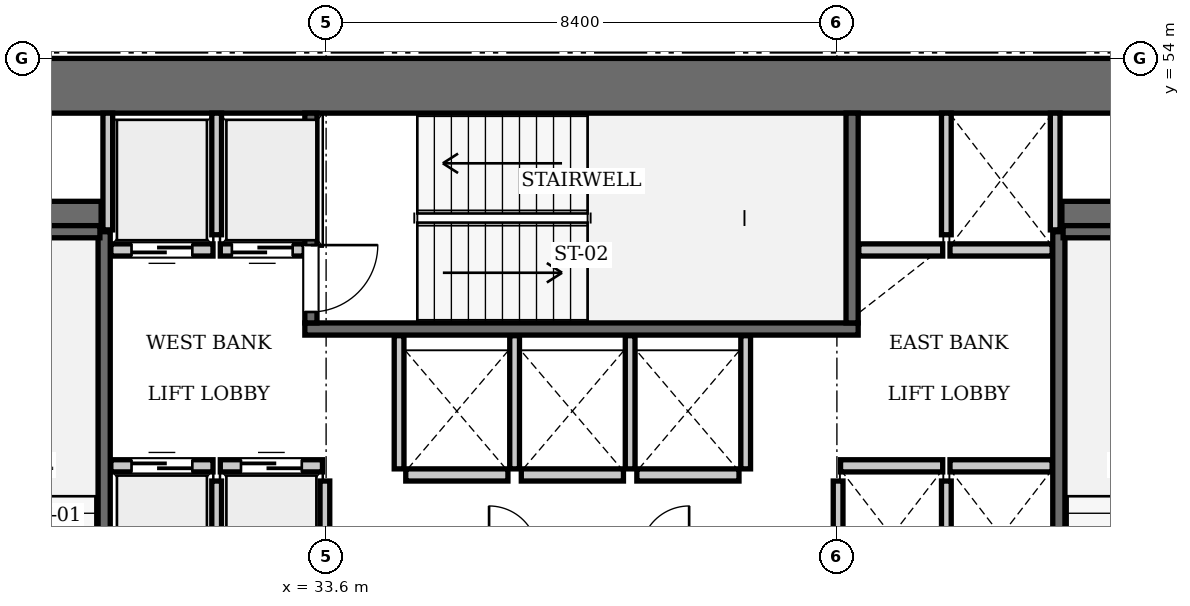
"""IFC4 building model, lengths in metres.
Left out: names, types, materials, properties, quantities, classifications, styles, units other than length and angle.
Written with IfcOpenShell. Run it as: python <this file> out.ifc"""

import sys

from ifc_helpers import new_model, si_unit, direction, frame, frame_2d, origin, place, context, subcontext, project, spatial, rectangle, extrude, element, fill, save


model = new_model("IFC4")
c1 = context("Model", 3, precision=1e-05, world=origin(), true_north=direction((0.0, 1.0)))
c2 = subcontext(c1, "Body", "Model", "MODEL_VIEW")
j1 = project(units=[si_unit("LENGTHUNIT", "METRE"), si_unit("PLANEANGLEUNIT", "RADIAN")], contexts=[c1])
p1 = place(None, origin())
s1 = spatial("IfcSite", under=j1, at=p1, CompositionType="ELEMENT")
p2 = place(p1, origin())
s2 = spatial("IfcBuilding", under=s1, at=p2, CompositionType="ELEMENT")
p3 = place(p2, frame((0.0, 0.0, 84.7)))
s3 = spatial("IfcBuildingStorey", under=s2, at=p3, CompositionType="ELEMENT", Elevation=84.7)
p4 = place(p3, frame((25.2, 53.55, 0.0), z_axis=(0.0, 0.0, 1.0), x_axis=(1.0, 0.0, 0.0)))
e1 = element("IfcWall", 1, at=p4, inside=s3, PredefinedType="SHEAR", context=c2, shape_type="SweptSolid", body=[
    extrude(rectangle(XDim=25.2, YDim=0.9, at=frame_2d((12.6, 0.0))), origin(), (0.0, 0.0, 1.0), 3.85),
])
p5 = place(p3, frame((26.1, 51.4, 0.0), z_axis=(0.0, 0.0, 1.0), x_axis=(1.0, 0.0, 0.0)))
e2 = element("IfcWall", 2, at=p5, inside=s3, PredefinedType="SHEAR", context=c2, shape_type="SweptSolid", body=[
    extrude(rectangle(XDim=3.8, YDim=0.5, at=frame_2d((1.9, 0.0))), origin(), (0.0, 0.0, 1.0), 3.85),
])
p6 = place(p3, frame((45.7, 51.4, 0.0), z_axis=(0.0, 0.0, 1.0), x_axis=(1.0, 0.0, 0.0)))
e3 = element("IfcWall", 3, at=p6, inside=s3, PredefinedType="SHEAR", context=c2, shape_type="SweptSolid", body=[
    extrude(rectangle(XDim=3.8, YDim=0.5, at=frame_2d((1.9, 0.0))), origin(), (0.0, 0.0, 1.0), 3.85),
])
p7 = place(p3, frame((29.95, 42.3, 0.0), z_axis=(0.0, 0.0, 1.0), x_axis=(0.0, 1.0, 0.0)))
e4 = element("IfcWall", 4, at=p7, inside=s3, PredefinedType="SOLIDWALL", context=c2, shape_type="SweptSolid", body=[
    extrude(rectangle(XDim=8.85, YDim=0.2, at=frame_2d((4.425, 0.0))), origin(), (0.0, 0.0, 1.0), 3.61),
])
p8 = place(p3, frame((26.38, 51.15, 0.0), z_axis=(0.0, 0.0, 1.0), x_axis=(1.0, 0.0, 0.0)))
e5 = element("IfcWall", 5, at=p8, inside=s3, PredefinedType="SOLIDWALL", context=c2, shape_type="SweptSolid", body=[
    extrude(rectangle(XDim=3.5, YDim=0.2, at=frame_2d((1.75, 0.0))), origin(), (0.0, 0.0, 1.0), 3.61),
])
p9 = place(p3, frame((33.25, 49.55, 0.0), z_axis=(0.0, 0.0, 1.0), x_axis=(1.0, 0.0, 0.0)))
e6 = element("IfcWall", 6, at=p9, inside=s3, PredefinedType="SOLIDWALL", context=c2, shape_type="SweptSolid", body=[
    extrude(rectangle(XDim=9.1, YDim=0.2, at=frame_2d((4.55, 0.0))), origin(), (0.0, 0.0, 1.0), 3.61),
])
p10 = place(p3, frame((42.25, 49.65, 0.0), z_axis=(0.0, 0.0, 1.0), x_axis=(0.0, 1.0, 0.0)))
e7 = element("IfcWall", 7, at=p10, inside=s3, PredefinedType="SOLIDWALL", context=c2, shape_type="SweptSolid", body=[
    extrude(rectangle(XDim=3.45, YDim=0.2, at=frame_2d((1.725, 0.0))), origin(), (0.0, 0.0, 1.0), 3.61),
])
p11 = place(p3, frame((33.35, 49.65, 0.0), z_axis=(0.0, 0.0, 1.0), x_axis=(0.0, 1.0, 0.0)))
e8 = element("IfcWall", 8, at=p11, inside=s3, PredefinedType="SOLIDWALL", context=c2, shape_type="SweptSolid", body=[
    extrude(rectangle(XDim=3.45, YDim=0.2, at=frame_2d((1.725, 0.0))), origin(), (0.0, 0.0, 1.0), 3.61),
])
p12 = place(p11, frame((0.18, 0.0, 0.0)))
e9 = element("IfcOpeningElement", 9, at=p12, cuts=e8, PredefinedType="OPENING", context=c2, shape_type="SweptSolid", body=[
    extrude(rectangle(XDim=1.1, YDim=2.15, at=frame_2d((0.55, 1.075))), frame((0.0, 0.11, 0.0), z_axis=(0.0, -1.0, 0.0), x_axis=(1.0, 0.0, 0.0)), (0.0, 0.0, 1.0), 0.22),
])
p13 = place(p3, frame((45.65, 42.3, 0.0), z_axis=(0.0, 0.0, 1.0), x_axis=(0.0, 1.0, 0.0)))
e10 = element("IfcWall", 10, at=p13, inside=s3, PredefinedType="SOLIDWALL", context=c2, shape_type="SweptSolid", body=[
    extrude(rectangle(XDim=8.85, YDim=0.2, at=frame_2d((4.425, 0.0))), origin(), (0.0, 0.0, 1.0), 3.61),
])
p14 = place(p3, frame((45.72, 51.15, 0.0), z_axis=(0.0, 0.0, 1.0), x_axis=(1.0, 0.0, 0.0)))
e11 = element("IfcWall", 11, at=p14, inside=s3, PredefinedType="SOLIDWALL", context=c2, shape_type="SweptSolid", body=[
    extrude(rectangle(XDim=3.5, YDim=0.2, at=frame_2d((1.75, 0.0))), origin(), (0.0, 0.0, 1.0), 3.61),
])
p15 = place(p3, frame((30.06, 47.3, 0.0), z_axis=(0.0, 0.0, 1.0), x_axis=(1.0, 0.0, 0.0)))
e12 = element("IfcWall", 12, at=p15, inside=s3, PredefinedType="SOLIDWALL", context=c2, shape_type="SweptSolid", body=[
    extrude(rectangle(XDim=1.68, YDim=0.2, at=frame_2d((0.84, 0.0))), origin(), (0.0, 0.0, 1.0), 3.61),
])
p16 = place(p15, frame((0.34, 0.0, 0.0)))
e13 = element("IfcOpeningElement", 13, at=p16, cuts=e12, PredefinedType="OPENING", context=c2, shape_type="SweptSolid", body=[
    extrude(rectangle(XDim=1.0, YDim=2.15, at=frame_2d((0.5, 1.075))), frame((0.0, 0.11, 0.0), z_axis=(0.0, -1.0, 0.0), x_axis=(1.0, 0.0, 0.0)), (0.0, 0.0, 1.0), 0.22),
])
p17 = place(p3, frame((31.86, 47.3, 0.0), z_axis=(0.0, 0.0, 1.0), x_axis=(1.0, 0.0, 0.0)))
e14 = element("IfcWall", 14, at=p17, inside=s3, PredefinedType="SOLIDWALL", context=c2, shape_type="SweptSolid", body=[
    extrude(rectangle(XDim=1.68, YDim=0.2, at=frame_2d((0.84, 0.0))), origin(), (0.0, 0.0, 1.0), 3.61),
])
p18 = place(p17, frame((0.34, 0.0, 0.0)))
e15 = element("IfcOpeningElement", 15, at=p18, cuts=e14, PredefinedType="OPENING", context=c2, shape_type="SweptSolid", body=[
    extrude(rectangle(XDim=1.0, YDim=2.15, at=frame_2d((0.5, 1.075))), frame((0.0, 0.11, 0.0), z_axis=(0.0, -1.0, 0.0), x_axis=(1.0, 0.0, 0.0)), (0.0, 0.0, 1.0), 0.22),
])
p19 = place(p3, frame((30.06, 50.85, 0.0), z_axis=(0.0, 0.0, 1.0), x_axis=(1.0, 0.0, 0.0)))
e16 = element("IfcWall", 16, at=p19, inside=s3, PredefinedType="SOLIDWALL", context=c2, shape_type="SweptSolid", body=[
    extrude(rectangle(XDim=1.68, YDim=0.2, at=frame_2d((0.84, 0.0))), origin(), (0.0, 0.0, 1.0), 3.61),
])
p20 = place(p19, frame((0.34, 0.0, 0.0)))
e17 = element("IfcOpeningElement", 17, at=p20, cuts=e16, PredefinedType="OPENING", context=c2, shape_type="SweptSolid", body=[
    extrude(rectangle(XDim=1.0, YDim=2.15, at=frame_2d((0.5, 1.075))), frame((0.0, 0.11, 0.0), z_axis=(0.0, -1.0, 0.0), x_axis=(1.0, 0.0, 0.0)), (0.0, 0.0, 1.0), 0.22),
])
p21 = place(p3, frame((31.86, 50.85, 0.0), z_axis=(0.0, 0.0, 1.0), x_axis=(1.0, 0.0, 0.0)))
e18 = element("IfcWall", 18, at=p21, inside=s3, PredefinedType="SOLIDWALL", context=c2, shape_type="SweptSolid", body=[
    extrude(rectangle(XDim=1.38, YDim=0.2, at=frame_2d((0.69, 0.0))), origin(), (0.0, 0.0, 1.0), 3.61),
])
p22 = place(p21, frame((0.19, 0.0, 0.0)))
e19 = element("IfcOpeningElement", 19, at=p22, cuts=e18, PredefinedType="OPENING", context=c2, shape_type="SweptSolid", body=[
    extrude(rectangle(XDim=1.0, YDim=2.15, at=frame_2d((0.5, 1.075))), frame((0.0, 0.11, 0.0), z_axis=(0.0, -1.0, 0.0), x_axis=(1.0, 0.0, 0.0)), (0.0, 0.0, 1.0), 0.22),
])
for number, where, z_axis, x_axis in (
    (20, (42.06, 47.3, 0.0), (0.0, 0.0, 1.0), (1.0, 0.0, 0.0)),
    (21, (43.86, 47.3, 0.0), (0.0, 0.0, 1.0), (1.0, 0.0, 0.0)),
):
    element("IfcWall", number, at=place(p3, frame(where, z_axis=z_axis, x_axis=x_axis)), inside=s3, PredefinedType="SOLIDWALL", context=c2, shape_type="SweptSolid", body=[
        extrude(rectangle(XDim=1.68, YDim=0.2, at=frame_2d((0.84, 0.0))), origin(), (0.0, 0.0, 1.0), 3.61),
    ])
p23 = place(p3, frame((42.36, 50.85, 0.0), z_axis=(0.0, 0.0, 1.0), x_axis=(1.0, 0.0, 0.0)))
e22 = element("IfcWall", 22, at=p23, inside=s3, PredefinedType="SOLIDWALL", context=c2, shape_type="SweptSolid", body=[
    extrude(rectangle(XDim=1.38, YDim=0.2, at=frame_2d((0.69, 0.0))), origin(), (0.0, 0.0, 1.0), 3.61),
])
p24 = place(p3, frame((43.86, 50.85, 0.0), z_axis=(0.0, 0.0, 1.0), x_axis=(1.0, 0.0, 0.0)))
e23 = element("IfcWall", 23, at=p24, inside=s3, PredefinedType="SOLIDWALL", context=c2, shape_type="SweptSolid", body=[
    extrude(rectangle(XDim=1.68, YDim=0.2, at=frame_2d((0.84, 0.0))), origin(), (0.0, 0.0, 1.0), 3.61),
])
p25 = place(p3, frame((34.91, 47.15, 0.0), z_axis=(0.0, 0.0, 1.0), x_axis=(1.0, 0.0, 0.0)))
e24 = element("IfcWall", 24, at=p25, inside=s3, PredefinedType="SOLIDWALL", context=c2, shape_type="SweptSolid", body=[
    extrude(rectangle(XDim=1.68, YDim=0.2, at=frame_2d((0.84, 0.0))), origin(), (0.0, 0.0, 1.0), 3.61),
])
for number, where, z_axis, x_axis in (
    (25, (36.81, 47.15, 0.0), (0.0, 0.0, 1.0), (1.0, 0.0, 0.0)),
    (26, (38.71, 47.15, 0.0), (0.0, 0.0, 1.0), (1.0, 0.0, 0.0)),
):
    element("IfcWall", number, at=place(p3, frame(where, z_axis=z_axis, x_axis=x_axis)), inside=s3, PredefinedType="SOLIDWALL", context=c2, shape_type="SweptSolid", body=[
        extrude(rectangle(XDim=1.68, YDim=0.2, at=frame_2d((0.84, 0.0))), origin(), (0.0, 0.0, 1.0), 3.61),
    ])
for number, where, z_axis, x_axis in (
    (27, (31.8, 45.1, 0.0), (0.0, 0.0, 1.0), (0.0, 1.0, 0.0)),
    (28, (33.58, 45.1, 0.0), (0.0, 0.0, 1.0), (0.0, 1.0, 0.0)),
):
    element("IfcWall", number, at=place(p3, frame(where, z_axis=z_axis, x_axis=x_axis)), inside=s3, PredefinedType="SOLIDWALL", context=c2, shape_type="SweptSolid", body=[
        extrude(rectangle(XDim=1.95, YDim=0.16, at=frame_2d((0.975, 0.0))), origin(), (0.0, 0.0, 1.0), 3.61),
    ])
p26 = place(p3, frame((30.01, 51.18, 0.0), z_axis=(0.0, 0.0, 1.0), x_axis=(0.0, 1.0, 0.0)))
e29 = element("IfcWall", 29, at=p26, inside=s3, PredefinedType="SOLIDWALL", context=c2, shape_type="SweptSolid", body=[
    extrude(rectangle(XDim=1.92, YDim=0.16, at=frame_2d((0.96, 0.0))), origin(), (0.0, 0.0, 1.0), 3.61),
])
p27 = place(p3, frame((31.8, 51.1, 0.0), z_axis=(0.0, 0.0, 1.0), x_axis=(0.0, 1.0, 0.0)))
e30 = element("IfcWall", 30, at=p27, inside=s3, PredefinedType="SOLIDWALL", context=c2, shape_type="SweptSolid", body=[
    extrude(rectangle(XDim=2.0, YDim=0.16, at=frame_2d((1.0, 0.0))), origin(), (0.0, 0.0, 1.0), 3.61),
])
for number, where, z_axis, x_axis in (
    (31, (42.02, 45.1, 0.0), (0.0, 0.0, 1.0), (0.0, 1.0, 0.0)),
    (32, (43.8, 45.1, 0.0), (0.0, 0.0, 1.0), (0.0, 1.0, 0.0)),
):
    element("IfcWall", number, at=place(p3, frame(where, z_axis=z_axis, x_axis=x_axis)), inside=s3, PredefinedType="SOLIDWALL", context=c2, shape_type="SweptSolid", body=[
        extrude(rectangle(XDim=1.95, YDim=0.16, at=frame_2d((0.975, 0.0))), origin(), (0.0, 0.0, 1.0), 3.61),
    ])
p28 = place(p3, frame((45.59, 51.18, 0.0), z_axis=(0.0, 0.0, 1.0), x_axis=(0.0, 1.0, 0.0)))
e33 = element("IfcWall", 33, at=p28, inside=s3, PredefinedType="SOLIDWALL", context=c2, shape_type="SweptSolid", body=[
    extrude(rectangle(XDim=1.92, YDim=0.16, at=frame_2d((0.96, 0.0))), origin(), (0.0, 0.0, 1.0), 3.61),
])
p29 = place(p3, frame((43.8, 51.1, 0.0), z_axis=(0.0, 0.0, 1.0), x_axis=(0.0, 1.0, 0.0)))
e34 = element("IfcWall", 34, at=p29, inside=s3, PredefinedType="SOLIDWALL", context=c2, shape_type="SweptSolid", body=[
    extrude(rectangle(XDim=2.0, YDim=0.16, at=frame_2d((1.0, 0.0))), origin(), (0.0, 0.0, 1.0), 3.61),
])
for number, where, z_axis, x_axis in (
    (35, (34.8, 47.25, 0.0), (0.0, 0.0, 1.0), (0.0, 1.0, 0.0)),
    (36, (36.7, 47.25, 0.0), (0.0, 0.0, 1.0), (0.0, 1.0, 0.0)),
    (37, (38.6, 47.25, 0.0), (0.0, 0.0, 1.0), (0.0, 1.0, 0.0)),
    (38, (40.5, 47.25, 0.0), (0.0, 0.0, 1.0), (0.0, 1.0, 0.0)),
):
    element("IfcWall", number, at=place(p3, frame(where, z_axis=z_axis, x_axis=x_axis)), inside=s3, PredefinedType="SOLIDWALL", context=c2, shape_type="SweptSolid", body=[
        extrude(rectangle(XDim=2.19, YDim=0.16, at=frame_2d((1.095, 0.0))), origin(), (0.0, 0.0, 1.0), 3.61),
    ])
p30 = place(p12, frame((1.1, 0.0, 0.0), z_axis=(0.0, 0.0, 1.0), x_axis=(-1.0, 0.0, 0.0)))
e39 = element("IfcDoor", 39, at=p30, inside=s3, OperationType="SINGLE_SWING_LEFT", PredefinedType="DOOR", context=c2, shape_type="SweptSolid", body=[
    extrude(rectangle(XDim=1.1, YDim=2.15, at=frame_2d((0.55, 1.075))), frame((0.0, 0.025, 0.0), z_axis=(0.0, -1.0, 0.0), x_axis=(1.0, 0.0, 0.0)), (0.0, 0.0, 1.0), 0.05),
])
fill(e9, e39)
p31 = place(p16, origin())
e40 = element("IfcDoor", 40, at=p31, inside=s3, OperationType="SLIDING_TO_LEFT", PredefinedType="DOOR", context=c2, shape_type="SweptSolid", body=[
    extrude(rectangle(XDim=1.0, YDim=2.15, at=frame_2d((0.5, 1.075))), frame((0.0, 0.025, 0.0), z_axis=(0.0, -1.0, 0.0), x_axis=(1.0, 0.0, 0.0)), (0.0, 0.0, 1.0), 0.05),
])
fill(e13, e40)
p32 = place(p18, origin())
e41 = element("IfcDoor", 41, at=p32, inside=s3, OperationType="SLIDING_TO_LEFT", PredefinedType="DOOR", context=c2, shape_type="SweptSolid", body=[
    extrude(rectangle(XDim=1.0, YDim=2.15, at=frame_2d((0.5, 1.075))), frame((0.0, 0.025, 0.0), z_axis=(0.0, -1.0, 0.0), x_axis=(1.0, 0.0, 0.0)), (0.0, 0.0, 1.0), 0.05),
])
fill(e15, e41)
p33 = place(p20, frame((1.0, 0.0, 0.0), z_axis=(0.0, 0.0, 1.0), x_axis=(-1.0, 0.0, 0.0)))
e42 = element("IfcDoor", 42, at=p33, inside=s3, OperationType="SLIDING_TO_LEFT", PredefinedType="DOOR", context=c2, shape_type="SweptSolid", body=[
    extrude(rectangle(XDim=1.0, YDim=2.15, at=frame_2d((0.5, 1.075))), frame((0.0, 0.025, 0.0), z_axis=(0.0, -1.0, 0.0), x_axis=(1.0, 0.0, 0.0)), (0.0, 0.0, 1.0), 0.05),
])
fill(e17, e42)
p34 = place(p22, frame((1.0, 0.0, 0.0), z_axis=(0.0, 0.0, 1.0), x_axis=(-1.0, 0.0, 0.0)))
e43 = element("IfcDoor", 43, at=p34, inside=s3, OperationType="SLIDING_TO_LEFT", PredefinedType="DOOR", context=c2, shape_type="SweptSolid", body=[
    extrude(rectangle(XDim=1.0, YDim=2.15, at=frame_2d((0.5, 1.075))), frame((0.0, 0.025, 0.0), z_axis=(0.0, -1.0, 0.0), x_axis=(1.0, 0.0, 0.0)), (0.0, 0.0, 1.0), 0.05),
])
fill(e19, e43)
save(model, sys.argv[1])
